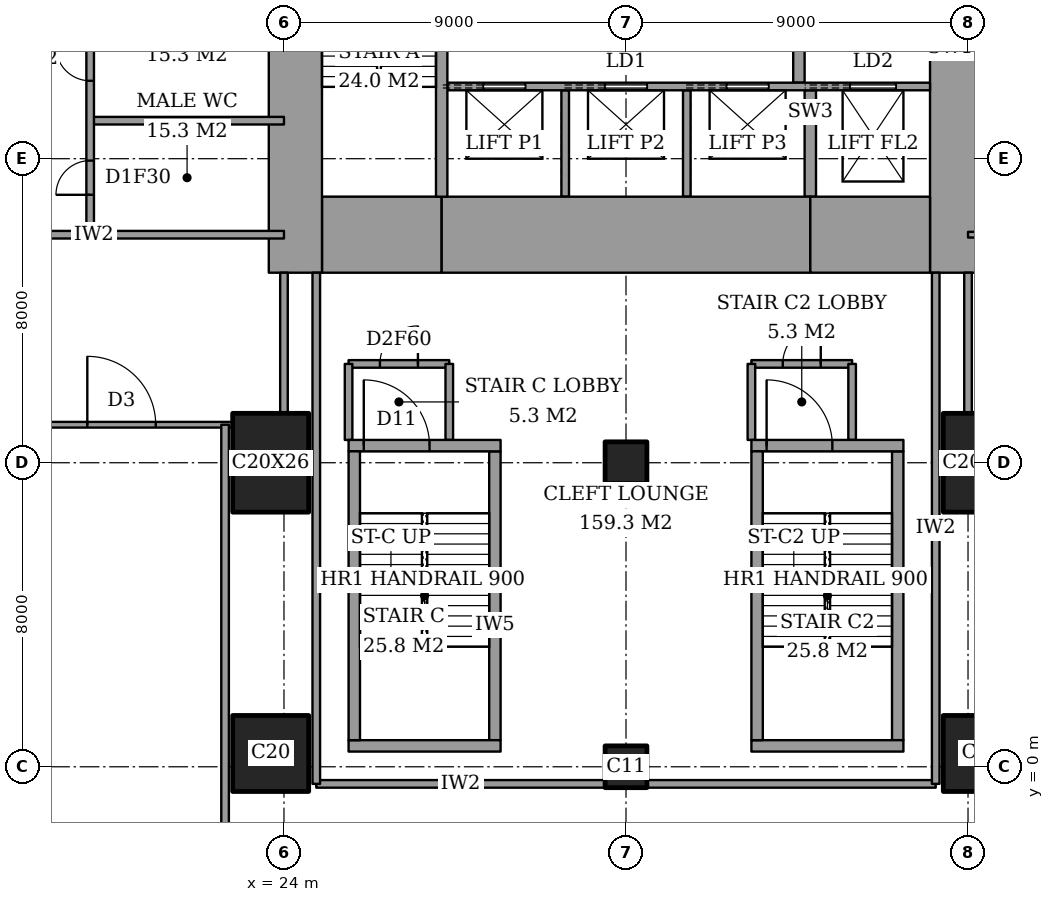
"""IFC4 building model, lengths in metres.
Left out: names, types, materials, properties, quantities, classifications, styles, units other than length and angle.
Written with IfcOpenShell. Run it as: python <this file> out.ifc"""

import sys

from ifc_helpers import new_model, si_unit, direction, frame, frame_2d, origin, origin_2d, place, context, subcontext, project, spatial, rectangle, extrude, element, fill, save


model = new_model("IFC4")
c1 = context("Model", 3, precision=1e-05, world=origin(), true_north=direction((0.0, 1.0)))
c2 = subcontext(c1, "Body", "Model", "MODEL_VIEW")
j1 = project(units=[si_unit("LENGTHUNIT", "METRE"), si_unit("PLANEANGLEUNIT", "RADIAN")], contexts=[c1])
p1 = place(None, origin())
s1 = spatial("IfcSite", under=j1, at=p1, CompositionType="ELEMENT")
p2 = place(p1, origin())
s2 = spatial("IfcBuilding", under=s1, at=p2, CompositionType="ELEMENT")
p3 = place(p2, frame((0.0, 0.0, 6.0)))
s3 = spatial("IfcBuildingStorey", under=s2, at=p3, CompositionType="ELEMENT", Elevation=6.0)
p4 = place(p3, frame((23.65, 0.35, 0.0), z_axis=(0.0, 0.0, 1.0), x_axis=(1.0, 0.0, 0.0)))
e1 = element("IfcColumn", 1, at=p4, inside=s3, PredefinedType="COLUMN", context=c2, shape_type="SweptSolid", body=[
    extrude(rectangle(XDim=2.0, YDim=2.0, at=origin_2d()), origin(), (0.0, 0.0, 1.0), 5.0),
])
p5 = place(p3, frame((23.65, 8.0, 0.0), z_axis=(0.0, 0.0, 1.0), x_axis=(1.0, 0.0, 0.0)))
e2 = element("IfcColumn", 2, at=p5, inside=s3, PredefinedType="COLUMN", context=c2, shape_type="SweptSolid", body=[
    extrude(rectangle(XDim=2.0, YDim=2.6, at=origin_2d()), origin(), (0.0, 0.0, 1.0), 5.0),
])
for number, where, z_axis, x_axis in (
    (3, (33.0, 0.0, 0.0), (0.0, 0.0, 1.0), (1.0, 0.0, 0.0)),
    (4, (33.0, 8.0, 0.0), (0.0, 0.0, 1.0), (1.0, 0.0, 0.0)),
):
    element("IfcColumn", number, at=place(p3, frame(where, z_axis=z_axis, x_axis=x_axis)), inside=s3, PredefinedType="COLUMN", context=c2, shape_type="SweptSolid", body=[
        extrude(rectangle(XDim=1.1, YDim=1.1, at=origin_2d()), origin(), (0.0, 0.0, 1.0), 5.0),
    ])
p6 = place(p3, frame((42.35, 0.35, 0.0), z_axis=(0.0, 0.0, 1.0), x_axis=(1.0, 0.0, 0.0)))
e5 = element("IfcColumn", 5, at=p6, inside=s3, PredefinedType="COLUMN", context=c2, shape_type="SweptSolid", body=[
    extrude(rectangle(XDim=2.0, YDim=2.0, at=origin_2d()), origin(), (0.0, 0.0, 1.0), 5.0),
])
p7 = place(p3, frame((42.35, 8.0, 0.0), z_axis=(0.0, 0.0, 1.0), x_axis=(1.0, 0.0, 0.0)))
e6 = element("IfcColumn", 6, at=p7, inside=s3, PredefinedType="COLUMN", context=c2, shape_type="SweptSolid", body=[
    extrude(rectangle(XDim=2.0, YDim=2.6, at=origin_2d()), origin(), (0.0, 0.0, 1.0), 5.0),
])
p8 = place(p3, frame((25.0, 14.0, 0.0), z_axis=(0.0, 0.0, 1.0), x_axis=(1.0, 0.0, 0.0)))
e7 = element("IfcWall", 7, at=p8, inside=s3, PredefinedType="SHEAR", context=c2, shape_type="SweptSolid", body=[
    extrude(rectangle(XDim=3.15, YDim=2.0, at=frame_2d((1.575, 0.0))), origin(), (0.0, 0.0, 1.0), 5.0),
])
p9 = place(p3, frame((28.15, 14.0, 0.0), z_axis=(0.0, 0.0, 1.0), x_axis=(1.0, 0.0, 0.0)))
e8 = element("IfcWall", 8, at=p9, inside=s3, PredefinedType="SHEAR", context=c2, shape_type="SweptSolid", body=[
    extrude(rectangle(XDim=9.7, YDim=2.0, at=frame_2d((4.85, 0.0))), origin(), (0.0, 0.0, 1.0), 5.0),
])
p10 = place(p3, frame((37.85, 14.0, 0.0), z_axis=(0.0, 0.0, 1.0), x_axis=(1.0, 0.0, 0.0)))
e9 = element("IfcWall", 9, at=p10, inside=s3, PredefinedType="SHEAR", context=c2, shape_type="SweptSolid", body=[
    extrude(rectangle(XDim=3.15, YDim=2.0, at=frame_2d((1.575, 0.0))), origin(), (0.0, 0.0, 1.0), 5.0),
])
p11 = place(p3, frame((24.3, 13.0, 0.0), z_axis=(0.0, 0.0, 1.0), x_axis=(0.0, 1.0, 0.0)))
e10 = element("IfcWall", 10, at=p11, inside=s3, PredefinedType="SHEAR", context=c2, shape_type="SweptSolid", body=[
    extrude(rectangle(XDim=10.15, YDim=1.4, at=frame_2d((5.075, 0.0))), origin(), (0.0, 0.0, 1.0), 5.0),
])
p12 = place(p3, frame((41.7, 13.0, 0.0), z_axis=(0.0, 0.0, 1.0), x_axis=(0.0, 1.0, 0.0)))
e11 = element("IfcWall", 11, at=p12, inside=s3, PredefinedType="SHEAR", context=c2, shape_type="SweptSolid", body=[
    extrude(rectangle(XDim=11.85, YDim=1.4, at=frame_2d((5.925, 0.0))), origin(), (0.0, 0.0, 1.0), 5.0),
])
p13 = place(p12, frame((7.5, 0.0, 0.0)))
e12 = element("IfcOpeningElement", 12, at=p13, cuts=e11, PredefinedType="OPENING", context=c2, shape_type="SweptSolid", body=[
    extrude(rectangle(XDim=1.8, YDim=2.4, at=frame_2d((0.9, 1.2))), frame((0.0, 0.71, 0.0), z_axis=(0.0, -1.0, 0.0), x_axis=(1.0, 0.0, 0.0)), (0.0, 0.0, 1.0), 1.42),
])
p14 = place(p3, frame((28.15, 15.0, 0.0), z_axis=(0.0, 0.0, 1.0), x_axis=(0.0, 1.0, 0.0)))
e13 = element("IfcWall", 13, at=p14, inside=s3, PredefinedType="SHEAR", context=c2, shape_type="SweptSolid", body=[
    extrude(rectangle(XDim=8.15, YDim=0.3, at=frame_2d((4.075, 0.0))), origin(), (0.0, 0.0, 1.0), 5.0),
])
p15 = place(p3, frame((37.55, 18.0, 0.0), z_axis=(0.0, 0.0, 1.0), x_axis=(0.0, 1.0, 0.0)))
e14 = element("IfcWall", 14, at=p15, inside=s3, PredefinedType="PARTITIONING", context=c2, shape_type="SweptSolid", body=[
    extrude(rectangle(XDim=6.7, YDim=0.3, at=frame_2d((3.35, 0.0))), origin(), (0.0, 0.0, 1.0), 5.0),
])
p16 = place(p15, frame((2.8, 0.0, 0.0)))
e15 = element("IfcOpeningElement", 15, at=p16, cuts=e14, PredefinedType="OPENING", context=c2, shape_type="SweptSolid", body=[
    extrude(rectangle(XDim=1.2, YDim=2.1, at=frame_2d((0.6, 1.05))), frame((0.0, 0.16, 0.0), z_axis=(0.0, -1.0, 0.0), x_axis=(1.0, 0.0, 0.0)), (0.0, 0.0, 1.0), 0.32),
])
for number, where, z_axis, x_axis in (
    (16, (24.85, -0.45, 0.0), (0.0, 0.0, 1.0), (1.0, 0.0, 0.0)),
    (17, (33.55, -0.45, 0.0), (0.0, 0.0, 1.0), (1.0, 0.0, 0.0)),
):
    element("IfcWall", number, at=place(p3, frame(where, z_axis=z_axis, x_axis=x_axis)), inside=s3, PredefinedType="PARTITIONING", context=c2, shape_type="SweptSolid", body=[
        extrude(rectangle(XDim=7.6, YDim=0.2, at=frame_2d((3.8, 0.0))), origin(), (0.0, 0.0, 1.0), 4.7),
    ])
p17 = place(p3, frame((17.0, 9.0, 0.0), z_axis=(0.0, 0.0, 1.0), x_axis=(1.0, 0.0, 0.0)))
e18 = element("IfcWall", 18, at=p17, inside=s3, PredefinedType="PARTITIONING", context=c2, shape_type="SweptSolid", body=[
    extrude(rectangle(XDim=5.65, YDim=0.15, at=frame_2d((2.825, 0.0))), origin(), (0.0, 0.0, 1.0), 4.7),
])
p18 = place(p17, frame((1.825, 0.0, 0.0)))
e19 = element("IfcOpeningElement", 19, at=p18, cuts=e18, PredefinedType="OPENING", context=c2, shape_type="SweptSolid", body=[
    extrude(rectangle(XDim=1.8, YDim=2.1, at=frame_2d((0.9, 1.05))), frame((0.0, 0.085, 0.0), z_axis=(0.0, -1.0, 0.0), x_axis=(1.0, 0.0, 0.0)), (0.0, 0.0, 1.0), 0.17),
])
p19 = place(p3, frame((25.7, 10.6, 0.0), z_axis=(0.0, 0.0, 1.0), x_axis=(1.0, 0.0, 0.0)))
e20 = element("IfcWall", 20, at=p19, inside=s3, PredefinedType="PARTITIONING", context=c2, shape_type="SweptSolid", body=[
    extrude(rectangle(XDim=2.65, YDim=0.2, at=frame_2d((1.325, 0.0))), origin(), (0.0, 0.0, 1.0), 4.7),
])
p20 = place(p19, frame((0.825, 0.0, 0.0)))
e21 = element("IfcOpeningElement", 21, at=p20, cuts=e20, PredefinedType="OPENING", context=c2, shape_type="SweptSolid", body=[
    extrude(rectangle(XDim=1.0, YDim=2.1, at=frame_2d((0.5, 1.05))), frame((0.0, 0.11, 0.0), z_axis=(0.0, -1.0, 0.0), x_axis=(1.0, 0.0, 0.0)), (0.0, 0.0, 1.0), 0.22),
])
p21 = place(p3, frame((36.3, 10.6, 0.0), z_axis=(0.0, 0.0, 1.0), x_axis=(1.0, 0.0, 0.0)))
e22 = element("IfcWall", 22, at=p21, inside=s3, PredefinedType="PARTITIONING", context=c2, shape_type="SweptSolid", body=[
    extrude(rectangle(XDim=2.65, YDim=0.2, at=frame_2d((1.325, 0.0))), origin(), (0.0, 0.0, 1.0), 4.7),
])
p22 = place(p21, frame((0.825, 0.0, 0.0)))
e23 = element("IfcOpeningElement", 23, at=p22, cuts=e22, PredefinedType="OPENING", context=c2, shape_type="SweptSolid", body=[
    extrude(rectangle(XDim=1.0, YDim=2.1, at=frame_2d((0.5, 1.05))), frame((0.0, 0.11, 0.0), z_axis=(0.0, -1.0, 0.0), x_axis=(1.0, 0.0, 0.0)), (0.0, 0.0, 1.0), 0.22),
])
p23 = place(p3, frame((14.0, 14.0, 0.0), z_axis=(0.0, 0.0, 1.0), x_axis=(1.0, 0.0, 0.0)))
e24 = element("IfcWall", 24, at=p23, inside=s3, PredefinedType="PARTITIONING", context=c2, shape_type="SweptSolid", body=[
    extrude(rectangle(XDim=10.0, YDim=0.2, at=frame_2d((5.0, 0.0))), origin(), (0.0, 0.0, 1.0), 4.7),
])
p24 = place(p3, frame((42.0, 14.0, 0.0), z_axis=(0.0, 0.0, 1.0), x_axis=(1.0, 0.0, 0.0)))
e25 = element("IfcWall", 25, at=p24, inside=s3, PredefinedType="PARTITIONING", context=c2, shape_type="SweptSolid", body=[
    extrude(rectangle(XDim=32.6, YDim=0.15, at=frame_2d((16.3, 0.0))), origin(), (0.0, 0.0, 1.0), 4.7),
])
p25 = place(p24, frame((9.5, 0.0, 0.0)))
e26 = element("IfcOpeningElement", 26, at=p25, cuts=e25, PredefinedType="OPENING", context=c2, shape_type="SweptSolid", body=[
    extrude(rectangle(XDim=1.0, YDim=2.1, at=frame_2d((0.5, 1.05))), frame((0.0, 0.085, 0.0), z_axis=(0.0, -1.0, 0.0), x_axis=(1.0, 0.0, 0.0)), (0.0, 0.0, 1.0), 0.17),
])
p26 = place(p3, frame((18.9, 17.0, 0.0), z_axis=(0.0, 0.0, 1.0), x_axis=(1.0, 0.0, 0.0)))
e27 = element("IfcWall", 27, at=p26, inside=s3, PredefinedType="PARTITIONING", context=c2, shape_type="SweptSolid", body=[
    extrude(rectangle(XDim=5.1, YDim=0.2, at=frame_2d((2.55, 0.0))), origin(), (0.0, 0.0, 1.0), 4.7),
])
p27 = place(p3, frame((18.9, 14.0, 0.0), z_axis=(0.0, 0.0, 1.0), x_axis=(0.0, 1.0, 0.0)))
e28 = element("IfcWall", 28, at=p27, inside=s3, PredefinedType="PARTITIONING", context=c2, shape_type="SweptSolid", body=[
    extrude(rectangle(XDim=6.0, YDim=0.2, at=frame_2d((3.0, 0.0))), origin(), (0.0, 0.0, 1.0), 4.7),
])
p28 = place(p27, frame((1.05, 0.0, 0.0)))
e29 = element("IfcOpeningElement", 29, at=p28, cuts=e28, PredefinedType="OPENING", context=c2, shape_type="SweptSolid", body=[
    extrude(rectangle(XDim=0.9, YDim=2.1, at=frame_2d((0.45, 1.05))), frame((0.0, 0.11, 0.0), z_axis=(0.0, -1.0, 0.0), x_axis=(1.0, 0.0, 0.0)), (0.0, 0.0, 1.0), 0.22),
])
p29 = place(p27, frame((4.05, 0.0, 0.0)))
e30 = element("IfcOpeningElement", 30, at=p29, cuts=e28, PredefinedType="OPENING", context=c2, shape_type="SweptSolid", body=[
    extrude(rectangle(XDim=0.9, YDim=2.1, at=frame_2d((0.45, 1.05))), frame((0.0, 0.11, 0.0), z_axis=(0.0, -1.0, 0.0), x_axis=(1.0, 0.0, 0.0)), (0.0, 0.0, 1.0), 0.22),
])
p30 = place(p3, frame((22.45, -16.561, 0.0), z_axis=(0.0, 0.0, 1.0), x_axis=(0.0, 1.0, 0.0)))
e31 = element("IfcWall", 31, at=p30, inside=s3, PredefinedType="PARTITIONING", context=c2, shape_type="SweptSolid", body=[
    extrude(rectangle(XDim=25.561, YDim=0.2, at=frame_2d((12.781, 0.0))), origin(), (0.0, 0.0, 1.0), 4.7),
])
p31 = place(p3, frame((24.0, 9.3, 0.0), z_axis=(0.0, 0.0, 1.0), x_axis=(0.0, 1.0, 0.0)))
e32 = element("IfcWall", 32, at=p31, inside=s3, PredefinedType="PARTITIONING", context=c2, shape_type="SweptSolid", body=[
    extrude(rectangle(XDim=3.7, YDim=0.2, at=frame_2d((1.85, 0.0))), origin(), (0.0, 0.0, 1.0), 4.7),
])
p32 = place(p3, frame((24.85, -0.45, 0.0), z_axis=(0.0, 0.0, 1.0), x_axis=(0.0, 1.0, 0.0)))
e33 = element("IfcWall", 33, at=p32, inside=s3, PredefinedType="PARTITIONING", context=c2, shape_type="SweptSolid", body=[
    extrude(rectangle(XDim=13.45, YDim=0.2, at=frame_2d((6.725, 0.0))), origin(), (0.0, 0.0, 1.0), 4.7),
])
for number, where, z_axis, x_axis in (
    (34, (25.7, 8.6, 0.0), (0.0, 0.0, 1.0), (0.0, 1.0, 0.0)),
    (35, (28.35, 8.6, 0.0), (0.0, 0.0, 1.0), (0.0, 1.0, 0.0)),
    (36, (36.3, 8.6, 0.0), (0.0, 0.0, 1.0), (0.0, 1.0, 0.0)),
    (37, (38.95, 8.6, 0.0), (0.0, 0.0, 1.0), (0.0, 1.0, 0.0)),
):
    element("IfcWall", number, at=place(p3, frame(where, z_axis=z_axis, x_axis=x_axis)), inside=s3, PredefinedType="PARTITIONING", context=c2, shape_type="SweptSolid", body=[
        extrude(rectangle(XDim=2.0, YDim=0.2, at=frame_2d((1.0, 0.0))), origin(), (0.0, 0.0, 1.0), 4.7),
    ])
p33 = place(p3, frame((41.15, -0.45, 0.0), z_axis=(0.0, 0.0, 1.0), x_axis=(0.0, 1.0, 0.0)))
e38 = element("IfcWall", 38, at=p33, inside=s3, PredefinedType="PARTITIONING", context=c2, shape_type="SweptSolid", body=[
    extrude(rectangle(XDim=13.45, YDim=0.2, at=frame_2d((6.725, 0.0))), origin(), (0.0, 0.0, 1.0), 4.7),
])
p34 = place(p3, frame((42.0, 9.3, 0.0), z_axis=(0.0, 0.0, 1.0), x_axis=(0.0, 1.0, 0.0)))
e39 = element("IfcWall", 39, at=p34, inside=s3, PredefinedType="PARTITIONING", context=c2, shape_type="SweptSolid", body=[
    extrude(rectangle(XDim=3.7, YDim=0.2, at=frame_2d((1.85, 0.0))), origin(), (0.0, 0.0, 1.0), 4.7),
])
p35 = place(p3, frame((28.3, 17.9, 0.0), z_axis=(0.0, 0.0, 1.0), x_axis=(1.0, 0.0, 0.0)))
e40 = element("IfcWall", 40, at=p35, inside=s3, PredefinedType="PARTITIONING", context=c2, shape_type="SweptSolid", body=[
    extrude(rectangle(XDim=12.7, YDim=0.2, at=frame_2d((6.35, 0.0))), origin(), (0.0, 0.0, 1.0), 5.0),
])
p36 = place(p35, frame((0.95, 0.0, 0.0)))
e41 = element("IfcOpeningElement", 41, at=p36, cuts=e40, PredefinedType="OPENING", context=c2, shape_type="SweptSolid", body=[
    extrude(rectangle(XDim=1.1, YDim=2.1, at=frame_2d((0.55, 1.05))), frame((0.0, 0.11, 0.0), z_axis=(0.0, -1.0, 0.0), x_axis=(1.0, 0.0, 0.0)), (0.0, 0.0, 1.0), 0.22),
])
p37 = place(p35, frame((4.15, 0.0, 0.0)))
e42 = element("IfcOpeningElement", 42, at=p37, cuts=e40, PredefinedType="OPENING", context=c2, shape_type="SweptSolid", body=[
    extrude(rectangle(XDim=1.1, YDim=2.1, at=frame_2d((0.55, 1.05))), frame((0.0, 0.11, 0.0), z_axis=(0.0, -1.0, 0.0), x_axis=(1.0, 0.0, 0.0)), (0.0, 0.0, 1.0), 0.22),
])
p38 = place(p35, frame((7.35, 0.0, 0.0)))
e43 = element("IfcOpeningElement", 43, at=p38, cuts=e40, PredefinedType="OPENING", context=c2, shape_type="SweptSolid", body=[
    extrude(rectangle(XDim=1.1, YDim=2.1, at=frame_2d((0.55, 1.05))), frame((0.0, 0.11, 0.0), z_axis=(0.0, -1.0, 0.0), x_axis=(1.0, 0.0, 0.0)), (0.0, 0.0, 1.0), 0.22),
])
p39 = place(p35, frame((10.6, 0.0, 0.0)))
e44 = element("IfcOpeningElement", 44, at=p39, cuts=e40, PredefinedType="OPENING", context=c2, shape_type="SweptSolid", body=[
    extrude(rectangle(XDim=1.2, YDim=2.1, at=frame_2d((0.6, 1.05))), frame((0.0, 0.11, 0.0), z_axis=(0.0, -1.0, 0.0), x_axis=(1.0, 0.0, 0.0)), (0.0, 0.0, 1.0), 0.22),
])
for number, where, z_axis, x_axis in (
    (45, (31.4, 15.0, 0.0), (0.0, 0.0, 1.0), (0.0, 1.0, 0.0)),
    (46, (34.6, 15.0, 0.0), (0.0, 0.0, 1.0), (0.0, 1.0, 0.0)),
):
    element("IfcWall", number, at=place(p3, frame(where, z_axis=z_axis, x_axis=x_axis)), inside=s3, PredefinedType="PARTITIONING", context=c2, shape_type="SweptSolid", body=[
        extrude(rectangle(XDim=2.8, YDim=0.2, at=frame_2d((1.4, 0.0))), origin(), (0.0, 0.0, 1.0), 5.0),
    ])
p40 = place(p3, frame((37.85, 15.0, 0.0), z_axis=(0.0, 0.0, 1.0), x_axis=(0.0, 1.0, 0.0)))
e47 = element("IfcWall", 47, at=p40, inside=s3, PredefinedType="SHEAR", context=c2, shape_type="SweptSolid", body=[
    extrude(rectangle(XDim=2.8, YDim=0.3, at=frame_2d((1.4, 0.0))), origin(), (0.0, 0.0, 1.0), 5.0),
])
p41 = place(p3, frame((25.7, 0.55, 0.0), z_axis=(0.0, 0.0, 1.0), x_axis=(1.0, 0.0, 0.0)))
e48 = element("IfcWall", 48, at=p41, inside=s3, PredefinedType="PARTITIONING", context=c2, shape_type="SweptSolid", body=[
    extrude(rectangle(XDim=4.0, YDim=0.3, at=frame_2d((2.0, 0.0))), origin(), (0.0, 0.0, 1.0), 5.0),
])
p42 = place(p3, frame((25.7, 8.45, 0.0), z_axis=(0.0, 0.0, 1.0), x_axis=(1.0, 0.0, 0.0)))
e49 = element("IfcWall", 49, at=p42, inside=s3, PredefinedType="PARTITIONING", context=c2, shape_type="SweptSolid", body=[
    extrude(rectangle(XDim=4.0, YDim=0.3, at=frame_2d((2.0, 0.0))), origin(), (0.0, 0.0, 1.0), 5.0),
])
p43 = place(p42, frame((0.4, 0.0, 0.0)))
e50 = element("IfcOpeningElement", 50, at=p43, cuts=e49, PredefinedType="OPENING", context=c2, shape_type="SweptSolid", body=[
    extrude(rectangle(XDim=1.73, YDim=2.1, at=frame_2d((0.865, 1.05))), frame((0.0, 0.16, 0.0), z_axis=(0.0, -1.0, 0.0), x_axis=(1.0, 0.0, 0.0)), (0.0, 0.0, 1.0), 0.32),
])
for number, where, z_axis, x_axis in (
    (51, (25.85, 0.7, 0.0), (0.0, 0.0, 1.0), (0.0, 1.0, 0.0)),
    (52, (29.55, 0.7, 0.0), (0.0, 0.0, 1.0), (0.0, 1.0, 0.0)),
):
    element("IfcWall", number, at=place(p3, frame(where, z_axis=z_axis, x_axis=x_axis)), inside=s3, PredefinedType="PARTITIONING", context=c2, shape_type="SweptSolid", body=[
        extrude(rectangle(XDim=7.6, YDim=0.3, at=frame_2d((3.8, 0.0))), origin(), (0.0, 0.0, 1.0), 5.0),
    ])
p44 = place(p3, frame((36.3, 0.55, 0.0), z_axis=(0.0, 0.0, 1.0), x_axis=(1.0, 0.0, 0.0)))
e53 = element("IfcWall", 53, at=p44, inside=s3, PredefinedType="PARTITIONING", context=c2, shape_type="SweptSolid", body=[
    extrude(rectangle(XDim=4.0, YDim=0.3, at=frame_2d((2.0, 0.0))), origin(), (0.0, 0.0, 1.0), 5.0),
])
p45 = place(p3, frame((36.3, 8.45, 0.0), z_axis=(0.0, 0.0, 1.0), x_axis=(1.0, 0.0, 0.0)))
e54 = element("IfcWall", 54, at=p45, inside=s3, PredefinedType="PARTITIONING", context=c2, shape_type="SweptSolid", body=[
    extrude(rectangle(XDim=4.0, YDim=0.3, at=frame_2d((2.0, 0.0))), origin(), (0.0, 0.0, 1.0), 5.0),
])
p46 = place(p45, frame((0.4, 0.0, 0.0)))
e55 = element("IfcOpeningElement", 55, at=p46, cuts=e54, PredefinedType="OPENING", context=c2, shape_type="SweptSolid", body=[
    extrude(rectangle(XDim=1.73, YDim=2.1, at=frame_2d((0.865, 1.05))), frame((0.0, 0.16, 0.0), z_axis=(0.0, -1.0, 0.0), x_axis=(1.0, 0.0, 0.0)), (0.0, 0.0, 1.0), 0.32),
])
for number, where, z_axis, x_axis in (
    (56, (36.45, 0.7, 0.0), (0.0, 0.0, 1.0), (0.0, 1.0, 0.0)),
    (57, (40.15, 0.7, 0.0), (0.0, 0.0, 1.0), (0.0, 1.0, 0.0)),
):
    element("IfcWall", number, at=place(p3, frame(where, z_axis=z_axis, x_axis=x_axis)), inside=s3, PredefinedType="PARTITIONING", context=c2, shape_type="SweptSolid", body=[
        extrude(rectangle(XDim=7.6, YDim=0.3, at=frame_2d((3.8, 0.0))), origin(), (0.0, 0.0, 1.0), 5.0),
    ])
p47 = place(p18, origin())
e58 = element("IfcDoor", 58, at=p47, inside=s3, OperationType="DOUBLE_DOOR_DOUBLE_SWING", PredefinedType="DOOR", context=c2, shape_type="SweptSolid", body=[
    extrude(rectangle(XDim=1.8, YDim=2.1, at=frame_2d((0.9, 1.05))), frame((0.0, 0.025, 0.0), z_axis=(0.0, -1.0, 0.0), x_axis=(1.0, 0.0, 0.0)), (0.0, 0.0, 1.0), 0.05),
])
fill(e19, e58)
p48 = place(p28, origin())
e59 = element("IfcDoor", 59, at=p48, inside=s3, OperationType="SINGLE_SWING_RIGHT", PredefinedType="DOOR", context=c2, shape_type="SweptSolid", body=[
    extrude(rectangle(XDim=0.9, YDim=2.1, at=frame_2d((0.45, 1.05))), frame((0.0, 0.025, 0.0), z_axis=(0.0, -1.0, 0.0), x_axis=(1.0, 0.0, 0.0)), (0.0, 0.0, 1.0), 0.05),
])
fill(e29, e59)
p49 = place(p29, origin())
e60 = element("IfcDoor", 60, at=p49, inside=s3, OperationType="SINGLE_SWING_LEFT", PredefinedType="DOOR", context=c2, shape_type="SweptSolid", body=[
    extrude(rectangle(XDim=0.9, YDim=2.1, at=frame_2d((0.45, 1.05))), frame((0.0, 0.025, 0.0), z_axis=(0.0, -1.0, 0.0), x_axis=(1.0, 0.0, 0.0)), (0.0, 0.0, 1.0), 0.05),
])
fill(e30, e60)
p50 = place(p20, origin())
e61 = element("IfcDoor", 61, at=p50, inside=s3, OperationType="SINGLE_SWING_LEFT", PredefinedType="DOOR", context=c2, shape_type="SweptSolid", body=[
    extrude(rectangle(XDim=1.0, YDim=2.1, at=frame_2d((0.5, 1.05))), frame((0.0, 0.025, 0.0), z_axis=(0.0, -1.0, 0.0), x_axis=(1.0, 0.0, 0.0)), (0.0, 0.0, 1.0), 0.05),
])
fill(e21, e61)
p51 = place(p22, origin())
e62 = element("IfcDoor", 62, at=p51, inside=s3, OperationType="SINGLE_SWING_LEFT", PredefinedType="DOOR", context=c2, shape_type="SweptSolid", body=[
    extrude(rectangle(XDim=1.0, YDim=2.1, at=frame_2d((0.5, 1.05))), frame((0.0, 0.025, 0.0), z_axis=(0.0, -1.0, 0.0), x_axis=(1.0, 0.0, 0.0)), (0.0, 0.0, 1.0), 0.05),
])
fill(e23, e62)
p52 = place(p36, origin())
e63 = element("IfcDoor", 63, at=p52, inside=s3, OperationType="SLIDING_TO_LEFT", PredefinedType="DOOR", context=c2, shape_type="SweptSolid", body=[
    extrude(rectangle(XDim=1.1, YDim=2.1, at=frame_2d((0.55, 1.05))), frame((0.0, 0.025, 0.0), z_axis=(0.0, -1.0, 0.0), x_axis=(1.0, 0.0, 0.0)), (0.0, 0.0, 1.0), 0.05),
])
fill(e41, e63)
p53 = place(p37, origin())
e64 = element("IfcDoor", 64, at=p53, inside=s3, OperationType="SLIDING_TO_LEFT", PredefinedType="DOOR", context=c2, shape_type="SweptSolid", body=[
    extrude(rectangle(XDim=1.1, YDim=2.1, at=frame_2d((0.55, 1.05))), frame((0.0, 0.025, 0.0), z_axis=(0.0, -1.0, 0.0), x_axis=(1.0, 0.0, 0.0)), (0.0, 0.0, 1.0), 0.05),
])
fill(e42, e64)
p54 = place(p38, origin())
e65 = element("IfcDoor", 65, at=p54, inside=s3, OperationType="SLIDING_TO_LEFT", PredefinedType="DOOR", context=c2, shape_type="SweptSolid", body=[
    extrude(rectangle(XDim=1.1, YDim=2.1, at=frame_2d((0.55, 1.05))), frame((0.0, 0.025, 0.0), z_axis=(0.0, -1.0, 0.0), x_axis=(1.0, 0.0, 0.0)), (0.0, 0.0, 1.0), 0.05),
])
fill(e43, e65)
p55 = place(p39, origin())
e66 = element("IfcDoor", 66, at=p55, inside=s3, OperationType="SLIDING_TO_LEFT", PredefinedType="DOOR", context=c2, shape_type="SweptSolid", body=[
    extrude(rectangle(XDim=1.2, YDim=2.1, at=frame_2d((0.6, 1.05))), frame((0.0, 0.025, 0.0), z_axis=(0.0, -1.0, 0.0), x_axis=(1.0, 0.0, 0.0)), (0.0, 0.0, 1.0), 0.05),
])
fill(e44, e66)
p56 = place(p43, origin())
e67 = element("IfcDoor", 67, at=p56, inside=s3, OperationType="DOUBLE_DOOR_SINGLE_SWING", PredefinedType="DOOR", context=c2, shape_type="SweptSolid", body=[
    extrude(rectangle(XDim=1.73, YDim=2.1, at=frame_2d((0.865, 1.05))), frame((0.0, 0.025, 0.0), z_axis=(0.0, -1.0, 0.0), x_axis=(1.0, 0.0, 0.0)), (0.0, 0.0, 1.0), 0.05),
])
fill(e50, e67)
p57 = place(p46, origin())
e68 = element("IfcDoor", 68, at=p57, inside=s3, OperationType="DOUBLE_DOOR_SINGLE_SWING", PredefinedType="DOOR", context=c2, shape_type="SweptSolid", body=[
    extrude(rectangle(XDim=1.73, YDim=2.1, at=frame_2d((0.865, 1.05))), frame((0.0, 0.025, 0.0), z_axis=(0.0, -1.0, 0.0), x_axis=(1.0, 0.0, 0.0)), (0.0, 0.0, 1.0), 0.05),
])
fill(e55, e68)
save(model, sys.argv[1])
